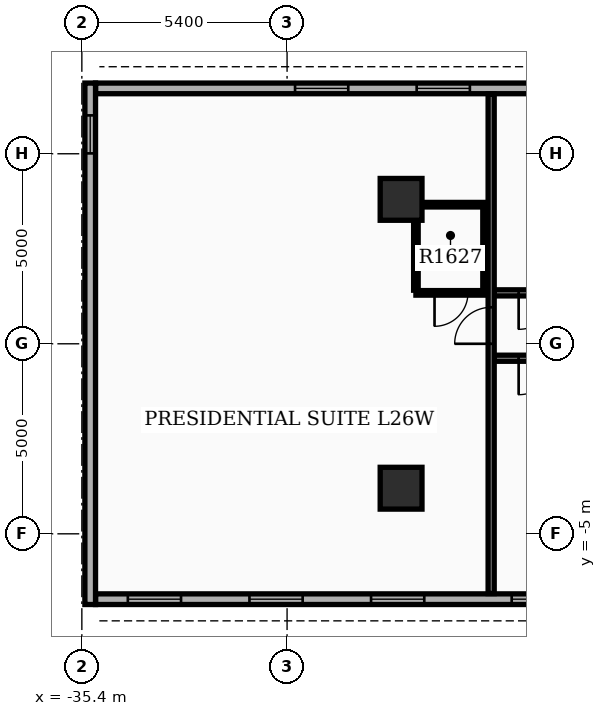
"""IFC4 building model, lengths in metres.
Left out: names, types, materials, properties, quantities, classifications, styles, units other than length and angle.
Written with IfcOpenShell. Run it as: python <this file> out.ifc"""

import sys

from ifc_helpers import new_model, si_unit, direction, frame, frame_2d, origin, origin_2d, place, context, subcontext, project, spatial, rectangle, extrude, element, fill, save


model = new_model("IFC4")
c1 = context("Model", 3, precision=1e-05, world=origin(), true_north=direction((0.0, 1.0)))
c2 = subcontext(c1, "Body", "Model", "MODEL_VIEW")
j1 = project(units=[si_unit("LENGTHUNIT", "METRE"), si_unit("PLANEANGLEUNIT", "RADIAN")], contexts=[c1])
p1 = place(None, origin())
s1 = spatial("IfcSite", under=j1, at=p1, CompositionType="ELEMENT")
p2 = place(p1, origin())
s2 = spatial("IfcBuilding", under=s1, at=p2, CompositionType="ELEMENT")
p3 = place(p2, frame((0.0, 0.0, 104.7)))
s3 = spatial("IfcBuildingStorey", under=s2, at=p3, CompositionType="ELEMENT", Elevation=104.7)
for number, where, z_axis, x_axis in (
    (1, (-27.0, -3.8, 0.0), (0.0, 0.0, 1.0), (1.0, 0.0, 0.0)),
    (2, (-27.0, 3.8, 0.0), (0.0, 0.0, 1.0), (1.0, 0.0, 0.0)),
):
    element("IfcColumn", number, at=place(p3, frame(where, z_axis=z_axis, x_axis=x_axis)), inside=s3, PredefinedType="COLUMN", context=c2, shape_type="SweptSolid", body=[
        extrude(rectangle(XDim=1.1, YDim=1.1, at=origin_2d()), origin(), (0.0, 0.0, 1.0), 3.9),
    ])
p4 = place(p3, frame((-14.94, 6.72, 0.0), z_axis=(0.0, 0.0, 1.0), x_axis=(-1.0, 0.0, 0.0)))
e3 = element("IfcWall", 3, at=p4, inside=s3, PredefinedType="STANDARD", context=c2, shape_type="SweptSolid", body=[
    extrude(rectangle(XDim=20.1, YDim=0.28, at=frame_2d((10.05, 0.0))), origin(), (0.0, 0.0, 1.0), 2.97),
])
p5 = place(p4, frame((0.85, 0.0, 0.8)))
e4 = element("IfcOpeningElement", 4, at=p5, cuts=e3, PredefinedType="OPENING", context=c2, shape_type="SweptSolid", body=[
    extrude(rectangle(XDim=1.4, YDim=1.6, at=frame_2d((0.7, 0.8))), frame((0.0, 0.15, 0.0), z_axis=(0.0, -1.0, 0.0), x_axis=(1.0, 0.0, 0.0)), (0.0, 0.0, 1.0), 0.3),
])
p6 = place(p4, frame((6.55, 0.0, 0.8)))
e5 = element("IfcOpeningElement", 5, at=p6, cuts=e3, PredefinedType="OPENING", context=c2, shape_type="SweptSolid", body=[
    extrude(rectangle(XDim=1.4, YDim=1.6, at=frame_2d((0.7, 0.8))), frame((0.0, 0.15, 0.0), z_axis=(0.0, -1.0, 0.0), x_axis=(1.0, 0.0, 0.0)), (0.0, 0.0, 1.0), 0.3),
])
p7 = place(p4, frame((10.25, 0.0, 0.8)))
e6 = element("IfcOpeningElement", 6, at=p7, cuts=e3, PredefinedType="OPENING", context=c2, shape_type="SweptSolid", body=[
    extrude(rectangle(XDim=1.4, YDim=1.6, at=frame_2d((0.7, 0.8))), frame((0.0, 0.15, 0.0), z_axis=(0.0, -1.0, 0.0), x_axis=(1.0, 0.0, 0.0)), (0.0, 0.0, 1.0), 0.3),
])
p8 = place(p4, frame((13.45, 0.0, 0.8)))
e7 = element("IfcOpeningElement", 7, at=p8, cuts=e3, PredefinedType="OPENING", context=c2, shape_type="SweptSolid", body=[
    extrude(rectangle(XDim=1.4, YDim=1.6, at=frame_2d((0.7, 0.8))), frame((0.0, 0.15, 0.0), z_axis=(0.0, -1.0, 0.0), x_axis=(1.0, 0.0, 0.0)), (0.0, 0.0, 1.0), 0.3),
])
p9 = place(p3, frame((-35.04, -6.72, 0.0), z_axis=(0.0, 0.0, 1.0), x_axis=(1.0, 0.0, 0.0)))
e8 = element("IfcWall", 8, at=p9, inside=s3, PredefinedType="STANDARD", context=c2, shape_type="SweptSolid", body=[
    extrude(rectangle(XDim=20.1, YDim=0.28, at=frame_2d((10.05, 0.0))), origin(), (0.0, 0.0, 1.0), 2.97),
])
p10 = place(p9, frame((0.85, 0.0, 0.8)))
e9 = element("IfcOpeningElement", 9, at=p10, cuts=e8, PredefinedType="OPENING", context=c2, shape_type="SweptSolid", body=[
    extrude(rectangle(XDim=1.4, YDim=1.6, at=frame_2d((0.7, 0.8))), frame((0.0, 0.15, 0.0), z_axis=(0.0, -1.0, 0.0), x_axis=(1.0, 0.0, 0.0)), (0.0, 0.0, 1.0), 0.3),
])
p11 = place(p9, frame((4.05, 0.0, 0.8)))
e10 = element("IfcOpeningElement", 10, at=p11, cuts=e8, PredefinedType="OPENING", context=c2, shape_type="SweptSolid", body=[
    extrude(rectangle(XDim=1.4, YDim=1.6, at=frame_2d((0.7, 0.8))), frame((0.0, 0.15, 0.0), z_axis=(0.0, -1.0, 0.0), x_axis=(1.0, 0.0, 0.0)), (0.0, 0.0, 1.0), 0.3),
])
p12 = place(p9, frame((7.25, 0.0, 0.8)))
e11 = element("IfcOpeningElement", 11, at=p12, cuts=e8, PredefinedType="OPENING", context=c2, shape_type="SweptSolid", body=[
    extrude(rectangle(XDim=1.4, YDim=1.6, at=frame_2d((0.7, 0.8))), frame((0.0, 0.15, 0.0), z_axis=(0.0, -1.0, 0.0), x_axis=(1.0, 0.0, 0.0)), (0.0, 0.0, 1.0), 0.3),
])
p13 = place(p9, frame((10.95, 0.0, 0.8)))
e12 = element("IfcOpeningElement", 12, at=p13, cuts=e8, PredefinedType="OPENING", context=c2, shape_type="SweptSolid", body=[
    extrude(rectangle(XDim=1.4, YDim=1.6, at=frame_2d((0.7, 0.8))), frame((0.0, 0.15, 0.0), z_axis=(0.0, -1.0, 0.0), x_axis=(1.0, 0.0, 0.0)), (0.0, 0.0, 1.0), 0.3),
])
p14 = place(p9, frame((15.0, 0.0, 0.0)))
e13 = element("IfcOpeningElement", 13, at=p14, cuts=e8, PredefinedType="OPENING", context=c2, shape_type="SweptSolid", body=[
    extrude(rectangle(XDim=0.96, YDim=2.1, at=frame_2d((0.48, 1.05))), frame((0.0, 0.15, 0.0), z_axis=(0.0, -1.0, 0.0), x_axis=(1.0, 0.0, 0.0)), (0.0, 0.0, 1.0), 0.3),
])
p15 = place(p3, frame((-35.18, 6.86, 0.0), z_axis=(0.0, 0.0, 1.0), x_axis=(0.0, -1.0, 0.0)))
e14 = element("IfcWall", 14, at=p15, inside=s3, PredefinedType="STANDARD", context=c2, shape_type="SweptSolid", body=[
    extrude(rectangle(XDim=13.72, YDim=0.28, at=frame_2d((6.86, 0.0))), origin(), (0.0, 0.0, 1.0), 2.97),
])
p16 = place(p15, frame((0.85, 0.0, 0.85)))
e15 = element("IfcOpeningElement", 15, at=p16, cuts=e14, PredefinedType="OPENING", context=c2, shape_type="SweptSolid", body=[
    extrude(rectangle(XDim=1.0, YDim=1.5, at=frame_2d((0.5, 0.75))), frame((0.0, 0.15, 0.0), z_axis=(0.0, -1.0, 0.0), x_axis=(1.0, 0.0, 0.0)), (0.0, 0.0, 1.0), 0.3),
])
p17 = place(p3, frame((-14.85, 1.34, 0.0), z_axis=(0.0, 0.0, 1.0), x_axis=(-1.0, 0.0, 0.0)))
e16 = element("IfcWall", 16, at=p17, inside=s3, PredefinedType="PARTITIONING", context=c2, shape_type="SweptSolid", body=[
    extrude(rectangle(XDim=9.7, YDim=0.16, at=frame_2d((4.85, 0.0))), origin(), (0.0, 0.0, 1.0), 2.96),
])
p18 = place(p17, frame((2.575, 0.0, 0.0)))
e17 = element("IfcOpeningElement", 17, at=p18, cuts=e16, PredefinedType="OPENING", context=c2, shape_type="SweptSolid", body=[
    extrude(rectangle(XDim=0.96, YDim=2.15, at=frame_2d((0.48, 1.075))), frame((0.0, 0.09, 0.0), z_axis=(0.0, -1.0, 0.0), x_axis=(1.0, 0.0, 0.0)), (0.0, 0.0, 1.0), 0.18),
])
p19 = place(p17, frame((8.097, 0.0, 0.0)))
e18 = element("IfcOpeningElement", 18, at=p19, cuts=e16, PredefinedType="OPENING", context=c2, shape_type="SweptSolid", body=[
    extrude(rectangle(XDim=0.96, YDim=2.15, at=frame_2d((0.48, 1.075))), frame((0.0, 0.09, 0.0), z_axis=(0.0, -1.0, 0.0), x_axis=(1.0, 0.0, 0.0)), (0.0, 0.0, 1.0), 0.18),
])
p20 = place(p3, frame((-14.85, -0.38, 0.0), z_axis=(0.0, 0.0, 1.0), x_axis=(-1.0, 0.0, 0.0)))
e19 = element("IfcWall", 19, at=p20, inside=s3, PredefinedType="PARTITIONING", context=c2, shape_type="SweptSolid", body=[
    extrude(rectangle(XDim=9.7, YDim=0.16, at=frame_2d((4.85, 0.0))), origin(), (0.0, 0.0, 1.0), 2.96),
])
p21 = place(p20, frame((2.575, 0.0, 0.0)))
e20 = element("IfcOpeningElement", 20, at=p21, cuts=e19, PredefinedType="OPENING", context=c2, shape_type="SweptSolid", body=[
    extrude(rectangle(XDim=0.96, YDim=2.15, at=frame_2d((0.48, 1.075))), frame((0.0, 0.09, 0.0), z_axis=(0.0, -1.0, 0.0), x_axis=(1.0, 0.0, 0.0)), (0.0, 0.0, 1.0), 0.18),
])
p22 = place(p20, frame((8.097, 0.0, 0.0)))
e21 = element("IfcOpeningElement", 21, at=p22, cuts=e19, PredefinedType="OPENING", context=c2, shape_type="SweptSolid", body=[
    extrude(rectangle(XDim=0.96, YDim=2.15, at=frame_2d((0.48, 1.075))), frame((0.0, 0.09, 0.0), z_axis=(0.0, -1.0, 0.0), x_axis=(1.0, 0.0, 0.0)), (0.0, 0.0, 1.0), 0.18),
])
p23 = place(p3, frame((-24.63, -6.572, 0.0), z_axis=(0.0, 0.0, 1.0), x_axis=(0.0, 1.0, 0.0)))
e22 = element("IfcWall", 22, at=p23, inside=s3, PredefinedType="PARTITIONING", context=c2, shape_type="SweptSolid", body=[
    extrude(rectangle(XDim=13.144, YDim=0.16, at=frame_2d((6.572, 0.0))), origin(), (0.0, 0.0, 1.0), 2.96),
])
p24 = place(p23, frame((6.572, 0.0, 0.0)))
e23 = element("IfcOpeningElement", 23, at=p24, cuts=e22, PredefinedType="OPENING", context=c2, shape_type="SweptSolid", body=[
    extrude(rectangle(XDim=0.96, YDim=2.15, at=frame_2d((0.48, 1.075))), frame((0.0, 0.09, 0.0), z_axis=(0.0, -1.0, 0.0), x_axis=(1.0, 0.0, 0.0)), (0.0, 0.0, 1.0), 0.18),
])
for number, where, z_axis, x_axis in (
    (24, (-24.79, 1.41, 0.0), (0.0, 0.0, 1.0), (0.0, 1.0, 0.0)),
    (25, (-26.61, 1.41, 0.0), (0.0, 0.0, 1.0), (0.0, 1.0, 0.0)),
):
    element("IfcWall", number, at=place(p3, frame(where, z_axis=z_axis, x_axis=x_axis)), inside=s3, PredefinedType="PARTITIONING", context=c2, shape_type="SweptSolid", body=[
        extrude(rectangle(XDim=2.18, YDim=0.12, at=frame_2d((1.09, 0.0))), origin(), (0.0, 0.0, 1.0), 2.96),
    ])
p25 = place(p3, frame((-24.79, 1.34, 0.0), z_axis=(0.0, 0.0, 1.0), x_axis=(-1.0, 0.0, 0.0)))
e26 = element("IfcWall", 26, at=p25, inside=s3, PredefinedType="PARTITIONING", context=c2, shape_type="SweptSolid", body=[
    extrude(rectangle(XDim=1.82, YDim=0.12, at=frame_2d((0.91, 0.0))), origin(), (0.0, 0.0, 1.0), 2.96),
])
p26 = place(p25, frame((0.45, 0.0, 0.0)))
e27 = element("IfcOpeningElement", 27, at=p26, cuts=e26, PredefinedType="OPENING", context=c2, shape_type="SweptSolid", body=[
    extrude(rectangle(XDim=0.88, YDim=2.1, at=frame_2d((0.44, 1.05))), frame((0.0, 0.07, 0.0), z_axis=(0.0, -1.0, 0.0), x_axis=(1.0, 0.0, 0.0)), (0.0, 0.0, 1.0), 0.14),
])
p27 = place(p3, frame((-24.79, 3.66, 0.0), z_axis=(0.0, 0.0, 1.0), x_axis=(-1.0, 0.0, 0.0)))
e28 = element("IfcWall", 28, at=p27, inside=s3, PredefinedType="PARTITIONING", context=c2, shape_type="SweptSolid", body=[
    extrude(rectangle(XDim=1.82, YDim=0.12, at=frame_2d((0.91, 0.0))), origin(), (0.0, 0.0, 1.0), 2.96),
])
p28 = place(p7, origin())
e29 = element("IfcWindow", 29, at=p28, inside=s3, PartitioningType="SINGLE_PANEL", PredefinedType="WINDOW", context=c2, shape_type="SweptSolid", body=[
    extrude(rectangle(XDim=1.4, YDim=1.6, at=frame_2d((0.7, 0.8))), frame((0.0, 0.03, 0.0), z_axis=(0.0, -1.0, 0.0), x_axis=(1.0, 0.0, 0.0)), (0.0, 0.0, 1.0), 0.06),
])
fill(e6, e29)
p29 = place(p8, origin())
e30 = element("IfcWindow", 30, at=p29, inside=s3, PartitioningType="SINGLE_PANEL", PredefinedType="WINDOW", context=c2, shape_type="SweptSolid", body=[
    extrude(rectangle(XDim=1.4, YDim=1.6, at=frame_2d((0.7, 0.8))), frame((0.0, 0.03, 0.0), z_axis=(0.0, -1.0, 0.0), x_axis=(1.0, 0.0, 0.0)), (0.0, 0.0, 1.0), 0.06),
])
fill(e7, e30)
p30 = place(p10, origin())
e31 = element("IfcWindow", 31, at=p30, inside=s3, PartitioningType="SINGLE_PANEL", PredefinedType="WINDOW", context=c2, shape_type="SweptSolid", body=[
    extrude(rectangle(XDim=1.4, YDim=1.6, at=frame_2d((0.7, 0.8))), frame((0.0, 0.03, 0.0), z_axis=(0.0, -1.0, 0.0), x_axis=(1.0, 0.0, 0.0)), (0.0, 0.0, 1.0), 0.06),
])
fill(e9, e31)
p31 = place(p11, origin())
e32 = element("IfcWindow", 32, at=p31, inside=s3, PartitioningType="SINGLE_PANEL", PredefinedType="WINDOW", context=c2, shape_type="SweptSolid", body=[
    extrude(rectangle(XDim=1.4, YDim=1.6, at=frame_2d((0.7, 0.8))), frame((0.0, 0.03, 0.0), z_axis=(0.0, -1.0, 0.0), x_axis=(1.0, 0.0, 0.0)), (0.0, 0.0, 1.0), 0.06),
])
fill(e10, e32)
p32 = place(p12, origin())
e33 = element("IfcWindow", 33, at=p32, inside=s3, PartitioningType="SINGLE_PANEL", PredefinedType="WINDOW", context=c2, shape_type="SweptSolid", body=[
    extrude(rectangle(XDim=1.4, YDim=1.6, at=frame_2d((0.7, 0.8))), frame((0.0, 0.03, 0.0), z_axis=(0.0, -1.0, 0.0), x_axis=(1.0, 0.0, 0.0)), (0.0, 0.0, 1.0), 0.06),
])
fill(e11, e33)
p33 = place(p13, origin())
e34 = element("IfcWindow", 34, at=p33, inside=s3, PartitioningType="SINGLE_PANEL", PredefinedType="WINDOW", context=c2, shape_type="SweptSolid", body=[
    extrude(rectangle(XDim=1.4, YDim=1.6, at=frame_2d((0.7, 0.8))), frame((0.0, 0.03, 0.0), z_axis=(0.0, -1.0, 0.0), x_axis=(1.0, 0.0, 0.0)), (0.0, 0.0, 1.0), 0.06),
])
fill(e12, e34)
p34 = place(p16, origin())
e35 = element("IfcWindow", 35, at=p34, inside=s3, PartitioningType="SINGLE_PANEL", PredefinedType="WINDOW", context=c2, shape_type="SweptSolid", body=[
    extrude(rectangle(XDim=1.0, YDim=1.5, at=frame_2d((0.5, 0.75))), frame((0.0, 0.03, 0.0), z_axis=(0.0, -1.0, 0.0), x_axis=(1.0, 0.0, 0.0)), (0.0, 0.0, 1.0), 0.06),
])
fill(e15, e35)
p35 = place(p19, origin())
e36 = element("IfcDoor", 36, at=p35, inside=s3, OperationType="SINGLE_SWING_RIGHT", PredefinedType="DOOR", context=c2, shape_type="SweptSolid", body=[
    extrude(rectangle(XDim=0.96, YDim=2.15, at=frame_2d((0.48, 1.075))), frame((0.0, 0.025, 0.0), z_axis=(0.0, -1.0, 0.0), x_axis=(1.0, 0.0, 0.0)), (0.0, 0.0, 1.0), 0.05),
])
fill(e18, e36)
p36 = place(p22, origin())
e37 = element("IfcDoor", 37, at=p36, inside=s3, OperationType="SINGLE_SWING_RIGHT", PredefinedType="DOOR", context=c2, shape_type="SweptSolid", body=[
    extrude(rectangle(XDim=0.96, YDim=2.15, at=frame_2d((0.48, 1.075))), frame((0.0, 0.025, 0.0), z_axis=(0.0, -1.0, 0.0), x_axis=(1.0, 0.0, 0.0)), (0.0, 0.0, 1.0), 0.05),
])
fill(e21, e37)
p37 = place(p24, origin())
e38 = element("IfcDoor", 38, at=p37, inside=s3, OperationType="SINGLE_SWING_LEFT", PredefinedType="DOOR", context=c2, shape_type="SweptSolid", body=[
    extrude(rectangle(XDim=0.96, YDim=2.15, at=frame_2d((0.48, 1.075))), frame((0.0, 0.025, 0.0), z_axis=(0.0, -1.0, 0.0), x_axis=(1.0, 0.0, 0.0)), (0.0, 0.0, 1.0), 0.05),
])
fill(e23, e38)
p38 = place(p26, origin())
e39 = element("IfcDoor", 39, at=p38, inside=s3, OperationType="SINGLE_SWING_RIGHT", PredefinedType="DOOR", context=c2, shape_type="SweptSolid", body=[
    extrude(rectangle(XDim=0.88, YDim=2.1, at=frame_2d((0.44, 1.05))), frame((0.0, 0.025, 0.0), z_axis=(0.0, -1.0, 0.0), x_axis=(1.0, 0.0, 0.0)), (0.0, 0.0, 1.0), 0.05),
])
fill(e27, e39)
save(model, sys.argv[1])
